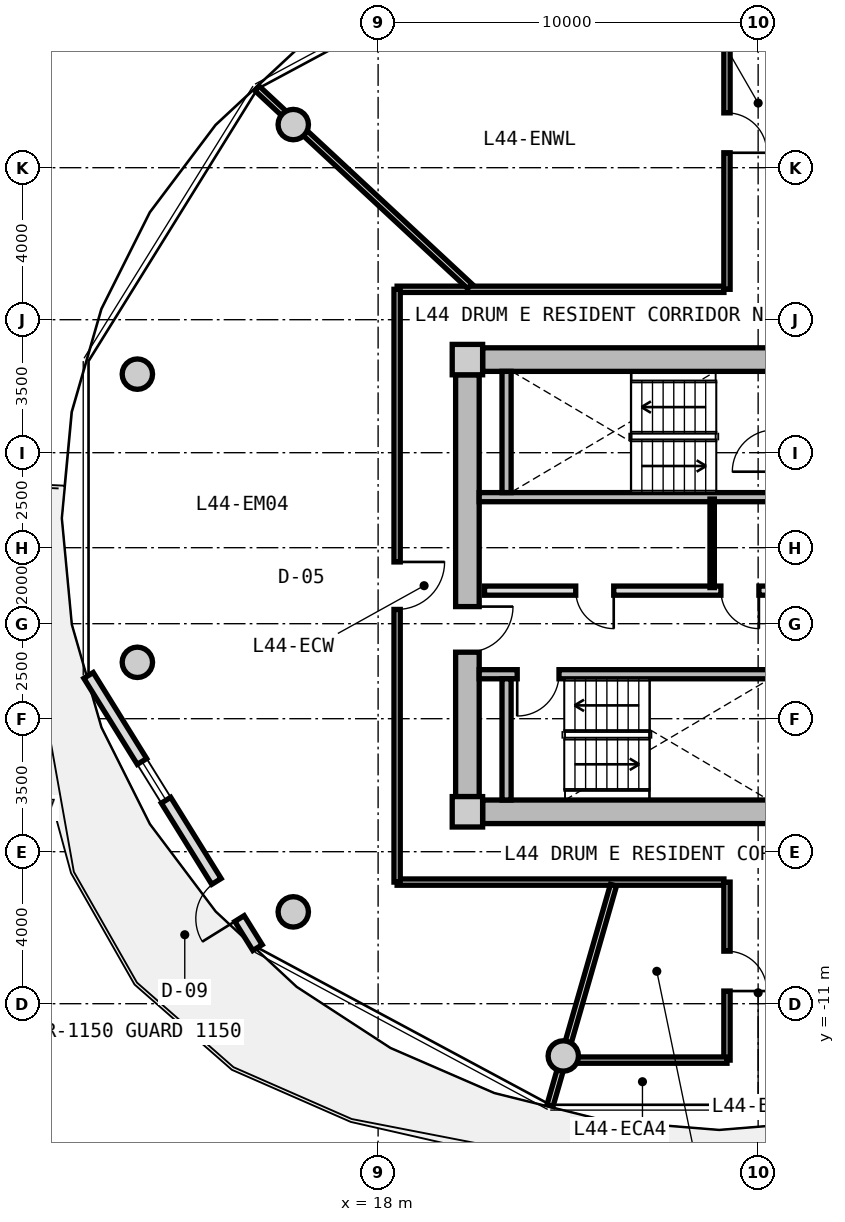
"""IFC4 building model, lengths in metres.
Left out: names, types, materials, properties, quantities, classifications, styles, units other than length and angle.
Written with IfcOpenShell. Run it as: python <this file> out.ifc"""

import sys

from ifc_helpers import new_model, si_unit, direction, frame, frame_2d, origin, origin_2d, place, context, subcontext, project, spatial, rectangle, circle, extrude, source, transform, mapped, element, fill, save


model = new_model("IFC4")
c1 = context("Model", 3, precision=1e-05, world=origin(), true_north=direction((0.0, 1.0)))
c2 = subcontext(c1, "Body", "Model", "MODEL_VIEW")
j1 = project(units=[si_unit("LENGTHUNIT", "METRE"), si_unit("PLANEANGLEUNIT", "RADIAN")], contexts=[c1])
p1 = place(None, origin())
s1 = spatial("IfcSite", under=j1, at=p1, CompositionType="ELEMENT")
p2 = place(p1, origin())
s2 = spatial("IfcBuilding", under=s1, at=p2, CompositionType="ELEMENT")
p3 = place(p2, frame((0.0, 0.0, 143.45)))
s3 = spatial("IfcBuildingStorey", under=s2, at=p3, CompositionType="ELEMENT", Elevation=143.45)
m1 = source(origin(), c2, "Body", "SweptSolid", [
    extrude(rectangle(XDim=0.8, YDim=0.8, at=origin_2d()), origin(), (0.0, 0.0, 1.0), 3.05),
])
for number, where, z_axis, x_axis in (
    (1, (20.35, -5.95, 0.0), (0.0, 0.0, 1.0), (1.0, 0.0, 0.0)),
    (2, (20.35, 5.95, 0.0), (0.0, 0.0, 1.0), (1.0, 0.0, 0.0)),
):
    element("IfcColumn", number, at=place(p3, frame(where, z_axis=z_axis, x_axis=x_axis)), inside=s3, PredefinedType="COLUMN", context=c2, shape_type="MappedRepresentation", body=[
        mapped(m1, transform((0.0, 0.0, 0.0), x_axis=(1.0, 0.0, 0.0), y_axis=(0.0, 1.0, 0.0), z_axis=(0.0, 0.0, 1.0), scale=1.0)),
    ])
m2 = source(origin(), c2, "Body", "SweptSolid", [
    extrude(rectangle(XDim=14.5, YDim=0.62, at=frame_2d((7.25, 0.0))), origin(), (0.0, 0.0, 1.0), 2.81),
])
for number, where, z_axis, x_axis in (
    (3, (20.75, 5.95, 0.0), (0.0, 0.0, 1.0), (1.0, 0.0, 0.0)),
    (4, (35.25, -5.95, 0.0), (0.0, 0.0, 1.0), (-1.0, 0.0, 0.0)),
):
    element("IfcWall", number, at=place(p3, frame(where, z_axis=z_axis, x_axis=x_axis)), inside=s3, PredefinedType="SHEAR", context=c2, shape_type="MappedRepresentation", body=[
        mapped(m2, transform((0.0, 0.0, 0.0), x_axis=(1.0, 0.0, 0.0), y_axis=(0.0, 1.0, 0.0), z_axis=(0.0, 0.0, 1.0), scale=1.0)),
    ])
m3 = source(origin(), c2, "Body", "SweptSolid", [
    extrude(rectangle(XDim=11.1, YDim=0.62, at=frame_2d((5.55, 0.0))), origin(), (0.0, 0.0, 1.0), 2.81),
])
p4 = place(p3, frame((20.35, -5.55, 0.0), z_axis=(0.0, 0.0, 1.0), x_axis=(0.0, 1.0, 0.0)))
e5 = element("IfcWall", 5, at=p4, inside=s3, PredefinedType="SHEAR", context=c2, shape_type="MappedRepresentation", body=[
    mapped(m3, transform((0.0, 0.0, 0.0), x_axis=(1.0, 0.0, 0.0), y_axis=(0.0, 1.0, 0.0), z_axis=(0.0, 0.0, 1.0), scale=1.0)),
])
p5 = place(p4, frame((3.8, 0.0, 0.0)))
e6 = element("IfcOpeningElement", 6, at=p5, cuts=e5, PredefinedType="OPENING", context=c2, shape_type="SweptSolid", body=[
    extrude(rectangle(XDim=1.2, YDim=2.15, at=frame_2d((0.6, 1.075))), frame((0.0, 0.32, 0.0), z_axis=(0.0, -1.0, 0.0), x_axis=(1.0, 0.0, 0.0)), (0.0, 0.0, 1.0), 0.64),
])
m4 = source(origin(), c2, "Body", "SweptSolid", [
    extrude(circle(Radius=0.4, at=origin_2d()), origin(), (0.0, 0.0, 1.0), 3.05),
])
for number, where, z_axis, x_axis in (
    (7, (15.767, 12.135, 0.0), (0.0, 0.0, 1.0), (1.0, 0.0, 0.0)),
    (8, (11.665, 5.567, 0.0), (0.0, 0.0, 1.0), (1.0, 0.0, 0.0)),
    (9, (11.665, -2.016, 0.0), (0.0, 0.0, 1.0), (1.0, 0.0, 0.0)),
    (10, (15.767, -8.584, 0.0), (0.0, 0.0, 1.0), (1.0, 0.0, 0.0)),
    (11, (22.873, -12.375, 0.0), (0.0, 0.0, 1.0), (1.0, 0.0, 0.0)),
):
    element("IfcColumn", number, at=place(p3, frame(where, z_axis=z_axis, x_axis=x_axis)), inside=s3, PredefinedType="COLUMN", context=c2, shape_type="MappedRepresentation", body=[
        mapped(m4, transform((0.0, 0.0, 0.0), x_axis=(1.0, 0.0, 0.0), y_axis=(0.0, 1.0, 0.0), z_axis=(0.0, 0.0, 1.0), scale=1.0)),
    ])
m5 = source(origin(), c2, "Body", "SweptSolid", [
    extrude(rectangle(XDim=8.431, YDim=0.29, at=frame_2d((4.216, 0.0))), origin(), (0.0, 0.0, 1.0), 2.81),
])
p6 = place(p3, frame((14.827, -9.524, 0.0), z_axis=(0.0, 0.0, 1.0), x_axis=(-0.527377998418, 0.849630770855, 0.0)))
e12 = element("IfcWall", 12, at=p6, inside=s3, PredefinedType="SOLIDWALL", context=c2, shape_type="MappedRepresentation", body=[
    mapped(m5, transform((0.0, 0.0, 0.0), x_axis=(1.0, 0.0, 0.0), y_axis=(0.0, 1.0, 0.0), z_axis=(0.0, 0.0, 1.0), scale=1.0)),
])
p7 = place(p6, frame((0.9, 0.0, 0.0)))
e13 = element("IfcOpeningElement", 13, at=p7, cuts=e12, PredefinedType="OPENING", context=c2, shape_type="SweptSolid", body=[
    extrude(rectangle(XDim=1.15, YDim=2.25, at=frame_2d((0.575, 1.125))), frame((0.0, 0.155, 0.0), z_axis=(0.0, -1.0, 0.0), x_axis=(1.0, 0.0, 0.0)), (0.0, 0.0, 1.0), 0.31),
])
p8 = place(p6, frame((4.566, 0.0, 0.85)))
e14 = element("IfcOpeningElement", 14, at=p8, cuts=e12, PredefinedType="OPENING", context=c2, shape_type="SweptSolid", body=[
    extrude(rectangle(XDim=1.2, YDim=1.5, at=frame_2d((0.6, 0.75))), frame((0.0, 0.155, 0.0), z_axis=(0.0, -1.0, 0.0), x_axis=(1.0, 0.0, 0.0)), (0.0, 0.0, 1.0), 0.31),
])
m6 = source(origin(), c2, "Body", "SweptSolid", [
    extrude(rectangle(XDim=7.88, YDim=0.24, at=frame_2d((3.94, 0.0))), origin(), (0.0, 0.0, 1.0), 2.81),
])
p9 = place(p3, frame((20.66, 2.33, 0.0), z_axis=(0.0, 0.0, 1.0), x_axis=(1.0, 0.0, 0.0)))
e15 = element("IfcWall", 15, at=p9, inside=s3, PredefinedType="PARTITIONING", context=c2, shape_type="MappedRepresentation", body=[
    mapped(m6, transform((0.0, 0.0, 0.0), x_axis=(1.0, 0.0, 0.0), y_axis=(0.0, 1.0, 0.0), z_axis=(0.0, 0.0, 1.0), scale=1.0)),
])
m7 = source(origin(), c2, "Body", "SweptSolid", [
    extrude(rectangle(XDim=3.19, YDim=0.24, at=frame_2d((1.595, 0.0))), origin(), (0.0, 0.0, 1.0), 2.81),
])
p10 = place(p3, frame((21.38, 2.45, 0.0), z_axis=(0.0, 0.0, 1.0), x_axis=(0.0, 1.0, 0.0)))
e16 = element("IfcWall", 16, at=p10, inside=s3, PredefinedType="PARTITIONING", context=c2, shape_type="MappedRepresentation", body=[
    mapped(m7, transform((0.0, 0.0, 0.0), x_axis=(1.0, 0.0, 0.0), y_axis=(0.0, 1.0, 0.0), z_axis=(0.0, 0.0, 1.0), scale=1.0)),
])
p11 = place(p3, frame((20.66, -2.33, 0.0), z_axis=(0.0, 0.0, 1.0), x_axis=(1.0, 0.0, 0.0)))
e17 = element("IfcWall", 17, at=p11, inside=s3, PredefinedType="PARTITIONING", context=c2, shape_type="MappedRepresentation", body=[
    mapped(m6, transform((0.0, 0.0, 0.0), x_axis=(1.0, 0.0, 0.0), y_axis=(0.0, 1.0, 0.0), z_axis=(0.0, 0.0, 1.0), scale=1.0)),
])
p12 = place(p11, frame((1.0, 0.0, 0.0)))
e18 = element("IfcOpeningElement", 18, at=p12, cuts=e17, PredefinedType="OPENING", context=c2, shape_type="SweptSolid", body=[
    extrude(rectangle(XDim=1.1, YDim=2.15, at=frame_2d((0.55, 1.075))), frame((0.0, 0.13, 0.0), z_axis=(0.0, -1.0, 0.0), x_axis=(1.0, 0.0, 0.0)), (0.0, 0.0, 1.0), 0.26),
])
p13 = place(p3, frame((21.38, -5.64, 0.0), z_axis=(0.0, 0.0, 1.0), x_axis=(0.0, 1.0, 0.0)))
e19 = element("IfcWall", 19, at=p13, inside=s3, PredefinedType="PARTITIONING", context=c2, shape_type="MappedRepresentation", body=[
    mapped(m7, transform((0.0, 0.0, 0.0), x_axis=(1.0, 0.0, 0.0), y_axis=(0.0, 1.0, 0.0), z_axis=(0.0, 0.0, 1.0), scale=1.0)),
])
m8 = source(origin(), c2, "Body", "SweptSolid", [
    extrude(rectangle(XDim=7.62, YDim=0.24, at=frame_2d((3.81, 0.0))), origin(), (0.0, 0.0, 1.0), 2.795),
])
p14 = place(p3, frame((20.8, -0.13, 0.0), z_axis=(0.0, 0.0, 1.0), x_axis=(1.0, 0.0, 0.0)))
e20 = element("IfcWall", 20, at=p14, inside=s3, PredefinedType="PARTITIONING", context=c2, shape_type="MappedRepresentation", body=[
    mapped(m8, transform((0.0, 0.0, 0.0), x_axis=(1.0, 0.0, 0.0), y_axis=(0.0, 1.0, 0.0), z_axis=(0.0, 0.0, 1.0), scale=1.0)),
])
p15 = place(p14, frame((6.22, 0.0, 0.0)))
e21 = element("IfcOpeningElement", 21, at=p15, cuts=e20, PredefinedType="OPENING", context=c2, shape_type="SweptSolid", body=[
    extrude(rectangle(XDim=1.0, YDim=2.1, at=frame_2d((0.5, 1.05))), frame((0.0, 0.13, 0.0), z_axis=(0.0, -1.0, 0.0), x_axis=(1.0, 0.0, 0.0)), (0.0, 0.0, 1.0), 0.26),
])
p16 = place(p14, frame((2.4, 0.0, 0.0)))
e22 = element("IfcOpeningElement", 22, at=p16, cuts=e20, PredefinedType="OPENING", context=c2, shape_type="SweptSolid", body=[
    extrude(rectangle(XDim=1.0, YDim=2.1, at=frame_2d((0.5, 1.05))), frame((0.0, 0.13, 0.0), z_axis=(0.0, -1.0, 0.0), x_axis=(1.0, 0.0, 0.0)), (0.0, 0.0, 1.0), 0.26),
])
m9 = source(origin(), c2, "Body", "SweptSolid", [
    extrude(rectangle(XDim=2.33, YDim=0.115, at=frame_2d((1.165, 0.0))), origin(), (0.0, 0.0, 1.0), 2.795),
])
p17 = place(p3, frame((26.79, -0.05, 0.0), z_axis=(0.0, 0.0, 1.0), x_axis=(0.0, 1.0, 0.0)))
e23 = element("IfcWall", 23, at=p17, inside=s3, PredefinedType="PARTITIONING", context=c2, shape_type="MappedRepresentation", body=[
    mapped(m9, transform((0.0, 0.0, 0.0), x_axis=(1.0, 0.0, 0.0), y_axis=(0.0, 1.0, 0.0), z_axis=(0.0, 0.0, 1.0), scale=1.0)),
])
m10 = source(origin(), c2, "Body", "SweptSolid", [
    extrude(rectangle(XDim=8.6, YDim=0.165, at=frame_2d((4.3, 0.0))), origin(), (0.0, 0.0, 1.0), 2.795),
])
for number, where, z_axis, x_axis in (
    (24, (18.5, 7.8, 0.0), (0.0, 0.0, 1.0), (1.0, 0.0, 0.0)),
    (25, (27.1, -7.8, 0.0), (0.0, 0.0, 1.0), (-1.0, 0.0, 0.0)),
):
    element("IfcWall", number, at=place(p3, frame(where, z_axis=z_axis, x_axis=x_axis)), inside=s3, PredefinedType="PARTITIONING", context=c2, shape_type="MappedRepresentation", body=[
        mapped(m10, transform((0.0, 0.0, 0.0), x_axis=(1.0, 0.0, 0.0), y_axis=(0.0, 1.0, 0.0), z_axis=(0.0, 0.0, 1.0), scale=1.0)),
    ])
m11 = source(origin(), c2, "Body", "SweptSolid", [
    extrude(rectangle(XDim=15.6, YDim=0.165, at=frame_2d((7.8, 0.0))), origin(), (0.0, 0.0, 1.0), 2.795),
])
p18 = place(p3, frame((18.5, -7.8, 0.0), z_axis=(0.0, 0.0, 1.0), x_axis=(0.0, 1.0, 0.0)))
e26 = element("IfcWall", 26, at=p18, inside=s3, PredefinedType="PARTITIONING", context=c2, shape_type="MappedRepresentation", body=[
    mapped(m11, transform((0.0, 0.0, 0.0), x_axis=(1.0, 0.0, 0.0), y_axis=(0.0, 1.0, 0.0), z_axis=(0.0, 0.0, 1.0), scale=1.0)),
])
p19 = place(p18, frame((7.175, 0.0, 0.0)))
e27 = element("IfcOpeningElement", 27, at=p19, cuts=e26, PredefinedType="OPENING", context=c2, shape_type="SweptSolid", body=[
    extrude(rectangle(XDim=1.25, YDim=2.2, at=frame_2d((0.625, 1.1))), frame((0.0, 0.093, 0.0), z_axis=(0.0, -1.0, 0.0), x_axis=(1.0, 0.0, 0.0)), (0.0, 0.0, 1.0), 0.185),
])
m12 = source(origin(), c2, "Body", "SweptSolid", [
    extrude(rectangle(XDim=7.648, YDim=0.165, at=frame_2d((3.824, 0.0))), origin(), (0.0, 0.0, 1.0), 2.345),
])
p20 = place(p3, frame((20.413, 7.88, 0.0), z_axis=(0.0, 0.0, 1.0), x_axis=(-0.732182665826, 0.681108320213, 0.0)))
e28 = element("IfcWall", 28, at=p20, inside=s3, PredefinedType="PARTITIONING", context=c2, shape_type="MappedRepresentation", body=[
    mapped(m12, transform((0.0, 0.0, 0.0), x_axis=(1.0, 0.0, 0.0), y_axis=(0.0, 1.0, 0.0), z_axis=(0.0, 0.0, 1.0), scale=1.0)),
])
m13 = source(origin(), c2, "Body", "SweptSolid", [
    extrude(rectangle(XDim=6.035, YDim=0.165, at=frame_2d((3.018, 0.0))), origin(), (0.0, 0.0, 1.0), 2.435),
])
p21 = place(p3, frame((24.194, -7.88, 0.0), z_axis=(0.0, 0.0, 1.0), x_axis=(-0.276809454862, -0.960924828329, 0.0)))
e29 = element("IfcWall", 29, at=p21, inside=s3, PredefinedType="PARTITIONING", context=c2, shape_type="MappedRepresentation", body=[
    mapped(m13, transform((0.0, 0.0, 0.0), x_axis=(1.0, 0.0, 0.0), y_axis=(0.0, 1.0, 0.0), z_axis=(0.0, 0.0, 1.0), scale=1.0)),
])
m14 = source(origin(), c2, "Body", "SweptSolid", [
    extrude(rectangle(XDim=8.235, YDim=0.165, at=frame_2d((4.118, 0.0))), origin(), (0.0, 0.0, 1.0), 2.795),
])
p22 = place(p3, frame((27.18, 7.8, 0.0), z_axis=(0.0, 0.0, 1.0), x_axis=(0.0, 1.0, 0.0)))
e30 = element("IfcWall", 30, at=p22, inside=s3, PredefinedType="PARTITIONING", context=c2, shape_type="MappedRepresentation", body=[
    mapped(m14, transform((0.0, 0.0, 0.0), x_axis=(1.0, 0.0, 0.0), y_axis=(0.0, 1.0, 0.0), z_axis=(0.0, 0.0, 1.0), scale=1.0)),
])
p23 = place(p22, frame((3.593, 0.0, 0.0)))
e31 = element("IfcOpeningElement", 31, at=p23, cuts=e30, PredefinedType="OPENING", context=c2, shape_type="SweptSolid", body=[
    extrude(rectangle(XDim=1.05, YDim=2.15, at=frame_2d((0.525, 1.075))), frame((0.0, 0.093, 0.0), z_axis=(0.0, -1.0, 0.0), x_axis=(1.0, 0.0, 0.0)), (0.0, 0.0, 1.0), 0.185),
])
m15 = source(origin(), c2, "Body", "SweptSolid", [
    extrude(rectangle(XDim=4.685, YDim=0.165, at=frame_2d((2.342, 0.0))), origin(), (0.0, 0.0, 1.0), 2.795),
])
p24 = place(p3, frame((27.18, -12.485, 0.0), z_axis=(0.0, 0.0, 1.0), x_axis=(0.0, 1.0, 0.0)))
e32 = element("IfcWall", 32, at=p24, inside=s3, PredefinedType="PARTITIONING", context=c2, shape_type="MappedRepresentation", body=[
    mapped(m15, transform((0.0, 0.0, 0.0), x_axis=(1.0, 0.0, 0.0), y_axis=(0.0, 1.0, 0.0), z_axis=(0.0, 0.0, 1.0), scale=1.0)),
])
p25 = place(p24, frame((1.817, 0.0, 0.0)))
e33 = element("IfcOpeningElement", 33, at=p25, cuts=e32, PredefinedType="OPENING", context=c2, shape_type="SweptSolid", body=[
    extrude(rectangle(XDim=1.05, YDim=2.15, at=frame_2d((0.525, 1.075))), frame((0.0, 0.093, 0.0), z_axis=(0.0, -1.0, 0.0), x_axis=(1.0, 0.0, 0.0)), (0.0, 0.0, 1.0), 0.185),
])
m16 = source(origin(), c2, "Body", "SweptSolid", [
    extrude(rectangle(XDim=4.469, YDim=0.165, at=frame_2d((2.234, 0.0))), origin(), (0.0, 0.0, 1.0), 2.345),
])
p26 = place(p3, frame((22.711, -12.485, 0.0), z_axis=(0.0, 0.0, 1.0), x_axis=(1.0, 0.0, 0.0)))
e34 = element("IfcWall", 34, at=p26, inside=s3, PredefinedType="PARTITIONING", context=c2, shape_type="MappedRepresentation", body=[
    mapped(m16, transform((0.0, 0.0, 0.0), x_axis=(1.0, 0.0, 0.0), y_axis=(0.0, 1.0, 0.0), z_axis=(0.0, 0.0, 1.0), scale=1.0)),
])
m17 = source(origin(), c2, "Body", "SweptSolid", [
    extrude(rectangle(XDim=1.15, YDim=2.25, at=frame_2d((0.575, 1.125))), frame((0.0, 0.025, 0.0), z_axis=(0.0, -1.0, 0.0), x_axis=(1.0, 0.0, 0.0)), (0.0, 0.0, 1.0), 0.05),
])
p27 = place(p7, origin())
e35 = element("IfcDoor", 35, at=p27, inside=s3, OperationType="SINGLE_SWING_LEFT", PredefinedType="DOOR", context=c2, shape_type="MappedRepresentation", body=[
    mapped(m17, transform((0.0, 0.0, 0.0), x_axis=(1.0, 0.0, 0.0), y_axis=(0.0, 1.0, 0.0), z_axis=(0.0, 0.0, 1.0), scale=1.0)),
])
fill(e13, e35)
m18 = source(origin(), c2, "Body", "SweptSolid", [
    extrude(rectangle(XDim=1.2, YDim=1.5, at=frame_2d((0.6, 0.75))), frame((0.0, 0.03, 0.0), z_axis=(0.0, -1.0, 0.0), x_axis=(1.0, 0.0, 0.0)), (0.0, 0.0, 1.0), 0.06),
])
p28 = place(p8, origin())
e36 = element("IfcWindow", 36, at=p28, inside=s3, PartitioningType="SINGLE_PANEL", PredefinedType="WINDOW", context=c2, shape_type="MappedRepresentation", body=[
    mapped(m18, transform((0.0, 0.0, 0.0), x_axis=(1.0, 0.0, 0.0), y_axis=(0.0, 1.0, 0.0), z_axis=(0.0, 0.0, 1.0), scale=1.0)),
])
fill(e14, e36)
m19 = source(origin(), c2, "Body", "SweptSolid", [
    extrude(rectangle(XDim=1.1, YDim=2.15, at=frame_2d((0.55, 1.075))), frame((0.0, 0.025, 0.0), z_axis=(0.0, -1.0, 0.0), x_axis=(1.0, 0.0, 0.0)), (0.0, 0.0, 1.0), 0.05),
])
p29 = place(p12, frame((1.1, 0.0, 0.0), z_axis=(0.0, 0.0, 1.0), x_axis=(-1.0, 0.0, 0.0)))
e37 = element("IfcDoor", 37, at=p29, inside=s3, OperationType="SINGLE_SWING_RIGHT", PredefinedType="DOOR", context=c2, shape_type="MappedRepresentation", body=[
    mapped(m19, transform((0.0, 0.0, 0.0), x_axis=(1.0, 0.0, 0.0), y_axis=(0.0, 1.0, 0.0), z_axis=(0.0, 0.0, 1.0), scale=1.0)),
])
fill(e18, e37)
m20 = source(origin(), c2, "Body", "SweptSolid", [
    extrude(rectangle(XDim=1.2, YDim=2.15, at=frame_2d((0.6, 1.075))), frame((0.0, 0.025, 0.0), z_axis=(0.0, -1.0, 0.0), x_axis=(1.0, 0.0, 0.0)), (0.0, 0.0, 1.0), 0.05),
])
p30 = place(p5, frame((1.2, 0.0, 0.0), z_axis=(0.0, 0.0, 1.0), x_axis=(-1.0, 0.0, 0.0)))
e38 = element("IfcDoor", 38, at=p30, inside=s3, OperationType="SINGLE_SWING_LEFT", PredefinedType="DOOR", context=c2, shape_type="MappedRepresentation", body=[
    mapped(m20, transform((0.0, 0.0, 0.0), x_axis=(1.0, 0.0, 0.0), y_axis=(0.0, 1.0, 0.0), z_axis=(0.0, 0.0, 1.0), scale=1.0)),
])
fill(e6, e38)
m21 = source(origin(), c2, "Body", "SweptSolid", [
    extrude(rectangle(XDim=1.0, YDim=2.1, at=frame_2d((0.5, 1.05))), frame((0.0, 0.025, 0.0), z_axis=(0.0, -1.0, 0.0), x_axis=(1.0, 0.0, 0.0)), (0.0, 0.0, 1.0), 0.05),
])
p31 = place(p15, frame((1.0, 0.0, 0.0), z_axis=(0.0, 0.0, 1.0), x_axis=(-1.0, 0.0, 0.0)))
e39 = element("IfcDoor", 39, at=p31, inside=s3, OperationType="SINGLE_SWING_LEFT", PredefinedType="DOOR", context=c2, shape_type="MappedRepresentation", body=[
    mapped(m21, transform((0.0, 0.0, 0.0), x_axis=(1.0, 0.0, 0.0), y_axis=(0.0, 1.0, 0.0), z_axis=(0.0, 0.0, 1.0), scale=1.0)),
])
fill(e21, e39)
p32 = place(p16, frame((1.0, 0.0, 0.0), z_axis=(0.0, 0.0, 1.0), x_axis=(-1.0, 0.0, 0.0)))
e40 = element("IfcDoor", 40, at=p32, inside=s3, OperationType="SINGLE_SWING_LEFT", PredefinedType="DOOR", context=c2, shape_type="MappedRepresentation", body=[
    mapped(m21, transform((0.0, 0.0, 0.0), x_axis=(1.0, 0.0, 0.0), y_axis=(0.0, 1.0, 0.0), z_axis=(0.0, 0.0, 1.0), scale=1.0)),
])
fill(e22, e40)
m22 = source(origin(), c2, "Body", "SweptSolid", [
    extrude(rectangle(XDim=1.05, YDim=2.15, at=frame_2d((0.525, 1.075))), frame((0.0, 0.025, 0.0), z_axis=(0.0, -1.0, 0.0), x_axis=(1.0, 0.0, 0.0)), (0.0, 0.0, 1.0), 0.05),
])
p33 = place(p23, frame((1.05, 0.0, 0.0), z_axis=(0.0, 0.0, 1.0), x_axis=(-1.0, 0.0, 0.0)))
e41 = element("IfcDoor", 41, at=p33, inside=s3, OperationType="SINGLE_SWING_RIGHT", PredefinedType="DOOR", context=c2, shape_type="MappedRepresentation", body=[
    mapped(m22, transform((0.0, 0.0, 0.0), x_axis=(1.0, 0.0, 0.0), y_axis=(0.0, 1.0, 0.0), z_axis=(0.0, 0.0, 1.0), scale=1.0)),
])
fill(e31, e41)
p34 = place(p25, frame((1.05, 0.0, 0.0), z_axis=(0.0, 0.0, 1.0), x_axis=(-1.0, 0.0, 0.0)))
e42 = element("IfcDoor", 42, at=p34, inside=s3, OperationType="SINGLE_SWING_RIGHT", PredefinedType="DOOR", context=c2, shape_type="MappedRepresentation", body=[
    mapped(m22, transform((0.0, 0.0, 0.0), x_axis=(1.0, 0.0, 0.0), y_axis=(0.0, 1.0, 0.0), z_axis=(0.0, 0.0, 1.0), scale=1.0)),
])
fill(e33, e42)
m23 = source(origin(), c2, "Body", "SweptSolid", [
    extrude(rectangle(XDim=1.25, YDim=2.2, at=frame_2d((0.625, 1.1))), frame((0.0, 0.025, 0.0), z_axis=(0.0, -1.0, 0.0), x_axis=(1.0, 0.0, 0.0)), (0.0, 0.0, 1.0), 0.05),
])
p35 = place(p19, frame((1.25, 0.0, 0.0), z_axis=(0.0, 0.0, 1.0), x_axis=(-1.0, 0.0, 0.0)))
e43 = element("IfcDoor", 43, at=p35, inside=s3, OperationType="SINGLE_SWING_LEFT", PredefinedType="DOOR", context=c2, shape_type="MappedRepresentation", body=[
    mapped(m23, transform((0.0, 0.0, 0.0), x_axis=(1.0, 0.0, 0.0), y_axis=(0.0, 1.0, 0.0), z_axis=(0.0, 0.0, 1.0), scale=1.0)),
])
fill(e27, e43)
save(model, sys.argv[1])
